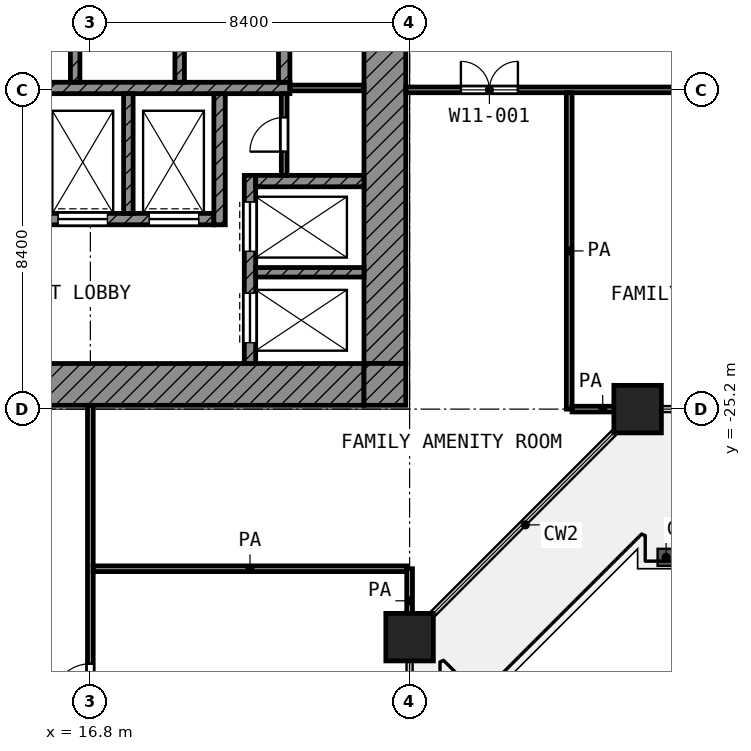
"""IFC4 building model, lengths in metres.
Left out: names, types, materials, properties, quantities, classifications, styles, units other than length and angle.
Written with IfcOpenShell. Run it as: python <this file> out.ifc"""

import sys

from ifc_helpers import new_model, si_unit, direction, frame, frame_2d, origin, origin_2d, place, context, subcontext, project, spatial, rectangle, extrude, element, fill, save


model = new_model("IFC4")
c1 = context("Model", 3, precision=1e-05, world=origin(), true_north=direction((0.0, 1.0)))
c2 = subcontext(c1, "Body", "Model", "MODEL_VIEW")
j1 = project(units=[si_unit("LENGTHUNIT", "METRE"), si_unit("PLANEANGLEUNIT", "RADIAN")], contexts=[c1])
p1 = place(None, origin())
s1 = spatial("IfcSite", under=j1, at=p1, CompositionType="ELEMENT")
p2 = place(p1, origin())
s2 = spatial("IfcBuilding", under=s1, at=p2, CompositionType="ELEMENT")
p3 = place(p2, frame((0.0, 0.0, 51.8)))
s3 = spatial("IfcBuildingStorey", under=s2, at=p3, CompositionType="ELEMENT", Elevation=51.8)
for number, where, z_axis, x_axis in (
    (1, (31.2, -25.2, 0.0), (0.0, 0.0, 1.0), (1.0, 0.0, 0.0)),
    (2, (25.2, -31.2, 0.0), (0.0, 0.0, 1.0), (1.0, 0.0, 0.0)),
):
    element("IfcColumn", number, at=place(p3, frame(where, z_axis=z_axis, x_axis=x_axis)), inside=s3, PredefinedType="COLUMN", context=c2, shape_type="SweptSolid", body=[
        extrude(rectangle(XDim=1.25, YDim=1.25, at=origin_2d()), origin(), (0.0, 0.0, 1.0), 4.2),
    ])
p4 = place(p3, frame((24.55, -24.0, 0.0), z_axis=(0.0, 0.0, 1.0), x_axis=(0.0, 1.0, 0.0)))
e3 = element("IfcWall", 3, at=p4, inside=s3, PredefinedType="SHEAR", context=c2, shape_type="SweptSolid", body=[
    extrude(rectangle(XDim=18.6, YDim=1.1, at=frame_2d((9.3, 0.0))), origin(), (0.0, 0.0, 1.0), 3.9),
])
p5 = place(p4, frame((10.5, 0.0, 0.0)))
e4 = element("IfcOpeningElement", 4, at=p5, cuts=e3, PredefinedType="OPENING", context=c2, shape_type="SweptSolid", body=[
    extrude(rectangle(XDim=1.8, YDim=2.1, at=frame_2d((0.9, 1.05))), frame((0.0, 0.56, 0.0), z_axis=(0.0, -1.0, 0.0), x_axis=(1.0, 0.0, 0.0)), (0.0, 0.0, 1.0), 1.12),
])
p6 = place(p3, frame((5.4, -24.55, 0.0), z_axis=(0.0, 0.0, 1.0), x_axis=(1.0, 0.0, 0.0)))
e5 = element("IfcWall", 5, at=p6, inside=s3, PredefinedType="SHEAR", context=c2, shape_type="SweptSolid", body=[
    extrude(rectangle(XDim=18.6, YDim=1.1, at=frame_2d((9.3, 0.0))), origin(), (0.0, 0.0, 1.0), 3.9),
])
p7 = place(p6, frame((6.3, 0.0, 0.0)))
e6 = element("IfcOpeningElement", 6, at=p7, cuts=e5, PredefinedType="OPENING", context=c2, shape_type="SweptSolid", body=[
    extrude(rectangle(XDim=1.8, YDim=2.1, at=frame_2d((0.9, 1.05))), frame((0.0, 0.56, 0.0), z_axis=(0.0, -1.0, 0.0), x_axis=(1.0, 0.0, 0.0)), (0.0, 0.0, 1.0), 1.12),
])
p8 = place(p3, frame((24.55, -25.1, 0.0), z_axis=(0.0, 0.0, 1.0), x_axis=(0.0, 1.0, 0.0)))
e7 = element("IfcWall", 7, at=p8, inside=s3, PredefinedType="SHEAR", context=c2, shape_type="SweptSolid", body=[
    extrude(rectangle(XDim=1.1, YDim=1.1, at=frame_2d((0.55, 0.0))), origin(), (0.0, 0.0, 1.0), 3.9),
])
p9 = place(p3, frame((5.4, -16.75, 0.0), z_axis=(0.0, 0.0, 1.0), x_axis=(1.0, 0.0, 0.0)))
e8 = element("IfcWall", 8, at=p9, inside=s3, PredefinedType="SHEAR", context=c2, shape_type="SweptSolid", body=[
    extrude(rectangle(XDim=16.65, YDim=0.3, at=frame_2d((8.325, 0.0))), origin(), (0.0, 0.0, 1.0), 3.9),
])
p10 = place(p3, frame((5.4, -20.2, 0.0), z_axis=(0.0, 0.0, 1.0), x_axis=(1.0, 0.0, 0.0)))
e9 = element("IfcWall", 9, at=p10, inside=s3, PredefinedType="SHEAR", context=c2, shape_type="SweptSolid", body=[
    extrude(rectangle(XDim=14.65, YDim=0.3, at=frame_2d((7.325, 0.0))), origin(), (0.0, 0.0, 1.0), 3.9),
])
p11 = place(p10, frame((10.55, 0.0, 0.0)))
e10 = element("IfcOpeningElement", 10, at=p11, cuts=e9, PredefinedType="OPENING", context=c2, shape_type="SweptSolid", body=[
    extrude(rectangle(XDim=1.3, YDim=2.1, at=frame_2d((0.65, 1.05))), frame((0.0, 0.16, 0.0), z_axis=(0.0, -1.0, 0.0), x_axis=(1.0, 0.0, 0.0)), (0.0, 0.0, 1.0), 0.32),
])
p12 = place(p10, frame((12.95, 0.0, 0.0)))
e11 = element("IfcOpeningElement", 11, at=p12, cuts=e9, PredefinedType="OPENING", context=c2, shape_type="SweptSolid", body=[
    extrude(rectangle(XDim=1.3, YDim=2.1, at=frame_2d((0.65, 1.05))), frame((0.0, 0.16, 0.0), z_axis=(0.0, -1.0, 0.0), x_axis=(1.0, 0.0, 0.0)), (0.0, 0.0, 1.0), 0.32),
])
p13 = place(p10, frame((0.55, 0.0, 0.0)))
e12 = element("IfcOpeningElement", 12, at=p13, cuts=e9, PredefinedType="OPENING", context=c2, shape_type="SweptSolid", body=[
    extrude(rectangle(XDim=1.3, YDim=2.1, at=frame_2d((0.65, 1.05))), frame((0.0, 0.16, 0.0), z_axis=(0.0, -1.0, 0.0), x_axis=(1.0, 0.0, 0.0)), (0.0, 0.0, 1.0), 0.32),
])
p14 = place(p10, frame((2.95, 0.0, 0.0)))
e13 = element("IfcOpeningElement", 13, at=p14, cuts=e9, PredefinedType="OPENING", context=c2, shape_type="SweptSolid", body=[
    extrude(rectangle(XDim=1.3, YDim=2.1, at=frame_2d((0.65, 1.05))), frame((0.0, 0.16, 0.0), z_axis=(0.0, -1.0, 0.0), x_axis=(1.0, 0.0, 0.0)), (0.0, 0.0, 1.0), 0.32),
])
p15 = place(p10, frame((6.55, 0.0, 0.0)))
e14 = element("IfcOpeningElement", 14, at=p15, cuts=e9, PredefinedType="OPENING", context=c2, shape_type="SweptSolid", body=[
    extrude(rectangle(XDim=0.9, YDim=2.1, at=frame_2d((0.45, 1.05))), frame((0.0, 0.16, 0.0), z_axis=(0.0, -1.0, 0.0), x_axis=(1.0, 0.0, 0.0)), (0.0, 0.0, 1.0), 0.32),
])
p16 = place(p10, frame((8.95, 0.0, 0.0)))
e15 = element("IfcOpeningElement", 15, at=p16, cuts=e9, PredefinedType="OPENING", context=c2, shape_type="SweptSolid", body=[
    extrude(rectangle(XDim=0.9, YDim=2.1, at=frame_2d((0.45, 1.05))), frame((0.0, 0.16, 0.0), z_axis=(0.0, -1.0, 0.0), x_axis=(1.0, 0.0, 0.0)), (0.0, 0.0, 1.0), 0.32),
])
p17 = place(p3, frame((20.2, -20.35, 0.0), z_axis=(0.0, 0.0, 1.0), x_axis=(0.0, 1.0, 0.0)))
e16 = element("IfcWall", 16, at=p17, inside=s3, PredefinedType="SHEAR", context=c2, shape_type="SweptSolid", body=[
    extrude(rectangle(XDim=3.45, YDim=0.3, at=frame_2d((1.725, 0.0))), origin(), (0.0, 0.0, 1.0), 3.9),
])
p18 = place(p3, frame((21.9, -16.6, 0.0), z_axis=(0.0, 0.0, 1.0), x_axis=(0.0, 1.0, 0.0)))
e17 = element("IfcWall", 17, at=p18, inside=s3, PredefinedType="SHEAR", context=c2, shape_type="SweptSolid", body=[
    extrude(rectangle(XDim=2.35, YDim=0.3, at=frame_2d((1.175, 0.0))), origin(), (0.0, 0.0, 1.0), 3.9),
])
p19 = place(p3, frame((21.15, -19.2, 0.0), z_axis=(0.0, 0.0, 1.0), x_axis=(1.0, 0.0, 0.0)))
e18 = element("IfcWall", 18, at=p19, inside=s3, PredefinedType="SHEAR", context=c2, shape_type="SweptSolid", body=[
    extrude(rectangle(XDim=2.85, YDim=0.3, at=frame_2d((1.425, 0.0))), origin(), (0.0, 0.0, 1.0), 3.9),
])
p20 = place(p3, frame((21.0, -24.0, 0.0), z_axis=(0.0, 0.0, 1.0), x_axis=(0.0, 1.0, 0.0)))
e19 = element("IfcWall", 19, at=p20, inside=s3, PredefinedType="SHEAR", context=c2, shape_type="SweptSolid", body=[
    extrude(rectangle(XDim=4.95, YDim=0.3, at=frame_2d((2.475, 0.0))), origin(), (0.0, 0.0, 1.0), 3.9),
])
p21 = place(p20, frame((2.95, 0.0, 0.0)))
e20 = element("IfcOpeningElement", 20, at=p21, cuts=e19, PredefinedType="OPENING", context=c2, shape_type="SweptSolid", body=[
    extrude(rectangle(XDim=1.3, YDim=2.1, at=frame_2d((0.65, 1.05))), frame((0.0, 0.16, 0.0), z_axis=(0.0, -1.0, 0.0), x_axis=(1.0, 0.0, 0.0)), (0.0, 0.0, 1.0), 0.32),
])
p22 = place(p20, frame((0.55, 0.0, 0.0)))
e21 = element("IfcOpeningElement", 21, at=p22, cuts=e19, PredefinedType="OPENING", context=c2, shape_type="SweptSolid", body=[
    extrude(rectangle(XDim=1.3, YDim=2.1, at=frame_2d((0.65, 1.05))), frame((0.0, 0.16, 0.0), z_axis=(0.0, -1.0, 0.0), x_axis=(1.0, 0.0, 0.0)), (0.0, 0.0, 1.0), 0.32),
])
p23 = place(p3, frame((21.15, -21.6, 0.0), z_axis=(0.0, 0.0, 1.0), x_axis=(1.0, 0.0, 0.0)))
e22 = element("IfcWall", 22, at=p23, inside=s3, PredefinedType="SHEAR", context=c2, shape_type="SweptSolid", body=[
    extrude(rectangle(XDim=2.85, YDim=0.25, at=frame_2d((1.425, 0.0))), origin(), (0.0, 0.0, 1.0), 3.9),
])
p24 = place(p3, frame((17.8, -20.05, 0.0), z_axis=(0.0, 0.0, 1.0), x_axis=(0.0, 1.0, 0.0)))
e23 = element("IfcWall", 23, at=p24, inside=s3, PredefinedType="SHEAR", context=c2, shape_type="SweptSolid", body=[
    extrude(rectangle(XDim=3.15, YDim=0.25, at=frame_2d((1.575, 0.0))), origin(), (0.0, 0.0, 1.0), 3.9),
])
for number, where, z_axis, x_axis in (
    (24, (16.4, -16.6, 0.0), (0.0, 0.0, 1.0), (0.0, 1.0, 0.0)),
    (25, (19.15, -16.6, 0.0), (0.0, 0.0, 1.0), (0.0, 1.0, 0.0)),
):
    element("IfcWall", number, at=place(p3, frame(where, z_axis=z_axis, x_axis=x_axis)), inside=s3, PredefinedType="SHEAR", context=c2, shape_type="SweptSolid", body=[
        extrude(rectangle(XDim=2.35, YDim=0.25, at=frame_2d((1.175, 0.0))), origin(), (0.0, 0.0, 1.0), 3.9),
    ])
p25 = place(p3, frame((21.9, -19.05, 0.0), z_axis=(0.0, 0.0, 1.0), x_axis=(0.0, 1.0, 0.0)))
e26 = element("IfcWall", 26, at=p25, inside=s3, PredefinedType="PARTITIONING", context=c2, shape_type="SweptSolid", body=[
    extrude(rectangle(XDim=2.15, YDim=0.15, at=frame_2d((1.075, 0.0))), origin(), (0.0, 0.0, 1.0), 3.9),
])
p26 = place(p25, frame((0.625, 0.0, 0.0)))
e27 = element("IfcOpeningElement", 27, at=p26, cuts=e26, PredefinedType="OPENING", context=c2, shape_type="SweptSolid", body=[
    extrude(rectangle(XDim=0.9, YDim=2.1, at=frame_2d((0.45, 1.05))), frame((0.0, 0.085, 0.0), z_axis=(0.0, -1.0, 0.0), x_axis=(1.0, 0.0, 0.0)), (0.0, 0.0, 1.0), 0.17),
])
p27 = place(p3, frame((22.05, -16.75, 0.0), z_axis=(0.0, 0.0, 1.0), x_axis=(1.0, 0.0, 0.0)))
e28 = element("IfcWall", 28, at=p27, inside=s3, PredefinedType="PARTITIONING", context=c2, shape_type="SweptSolid", body=[
    extrude(rectangle(XDim=1.95, YDim=0.15, at=frame_2d((0.975, 0.0))), origin(), (0.0, 0.0, 1.0), 3.9),
])
p28 = place(p3, frame((16.875, -29.4, 0.0), z_axis=(0.0, 0.0, 1.0), x_axis=(1.0, 0.0, 0.0)))
e29 = element("IfcWall", 29, at=p28, inside=s3, PredefinedType="PARTITIONING", context=c2, shape_type="SweptSolid", body=[
    extrude(rectangle(XDim=8.25, YDim=0.15, at=frame_2d((4.125, 0.0))), origin(), (0.0, 0.0, 1.0), 3.9),
])
p29 = place(p3, frame((29.475, -25.2, 0.0), z_axis=(0.0, 0.0, 1.0), x_axis=(1.0, 0.0, 0.0)))
e30 = element("IfcWall", 30, at=p29, inside=s3, PredefinedType="PARTITIONING", context=c2, shape_type="SweptSolid", body=[
    extrude(rectangle(XDim=1.612, YDim=0.15, at=frame_2d((0.806, 0.0))), origin(), (0.0, 0.0, 1.0), 3.9),
])
p30 = place(p3, frame((25.1, -16.8, 0.0), z_axis=(0.0, 0.0, 1.0), x_axis=(1.0, 0.0, 0.0)))
e31 = element("IfcWall", 31, at=p30, inside=s3, PredefinedType="PARTITIONING", context=c2, shape_type="SweptSolid", body=[
    extrude(rectangle(XDim=54.62, YDim=0.15, at=frame_2d((27.31, 0.0))), origin(), (0.0, 0.0, 1.0), 3.9),
])
p31 = place(p30, frame((1.45, 0.0, 0.0)))
e32 = element("IfcOpeningElement", 32, at=p31, cuts=e31, PredefinedType="OPENING", context=c2, shape_type="SweptSolid", body=[
    extrude(rectangle(XDim=1.5, YDim=2.1, at=frame_2d((0.75, 1.05))), frame((0.0, 0.085, 0.0), z_axis=(0.0, -1.0, 0.0), x_axis=(1.0, 0.0, 0.0)), (0.0, 0.0, 1.0), 0.17),
])
p32 = place(p30, frame((9.25, 0.0, 0.0)))
e33 = element("IfcOpeningElement", 33, at=p32, cuts=e31, PredefinedType="OPENING", context=c2, shape_type="SweptSolid", body=[
    extrude(rectangle(XDim=1.5, YDim=2.1, at=frame_2d((0.75, 1.05))), frame((0.0, 0.085, 0.0), z_axis=(0.0, -1.0, 0.0), x_axis=(1.0, 0.0, 0.0)), (0.0, 0.0, 1.0), 0.17),
])
p33 = place(p30, frame((15.0, 0.0, 0.0)))
e34 = element("IfcOpeningElement", 34, at=p33, cuts=e31, PredefinedType="OPENING", context=c2, shape_type="SweptSolid", body=[
    extrude(rectangle(XDim=1.2, YDim=2.1, at=frame_2d((0.6, 1.05))), frame((0.0, 0.085, 0.0), z_axis=(0.0, -1.0, 0.0), x_axis=(1.0, 0.0, 0.0)), (0.0, 0.0, 1.0), 0.17),
])
p34 = place(p30, frame((17.6, 0.0, 0.0)))
e35 = element("IfcOpeningElement", 35, at=p34, cuts=e31, PredefinedType="OPENING", context=c2, shape_type="SweptSolid", body=[
    extrude(rectangle(XDim=1.2, YDim=2.1, at=frame_2d((0.6, 1.05))), frame((0.0, 0.085, 0.0), z_axis=(0.0, -1.0, 0.0), x_axis=(1.0, 0.0, 0.0)), (0.0, 0.0, 1.0), 0.17),
])
p35 = place(p30, frame((26.2, 0.0, 0.0)))
e36 = element("IfcOpeningElement", 36, at=p35, cuts=e31, PredefinedType="OPENING", context=c2, shape_type="SweptSolid", body=[
    extrude(rectangle(XDim=1.2, YDim=2.1, at=frame_2d((0.6, 1.05))), frame((0.0, 0.085, 0.0), z_axis=(0.0, -1.0, 0.0), x_axis=(1.0, 0.0, 0.0)), (0.0, 0.0, 1.0), 0.17),
])
p36 = place(p30, frame((23.4, 0.0, 0.0)))
e37 = element("IfcOpeningElement", 37, at=p36, cuts=e31, PredefinedType="OPENING", context=c2, shape_type="SweptSolid", body=[
    extrude(rectangle(XDim=1.2, YDim=2.1, at=frame_2d((0.6, 1.05))), frame((0.0, 0.085, 0.0), z_axis=(0.0, -1.0, 0.0), x_axis=(1.0, 0.0, 0.0)), (0.0, 0.0, 1.0), 0.17),
])
p37 = place(p30, frame((28.45, 0.0, 0.0)))
e38 = element("IfcOpeningElement", 38, at=p37, cuts=e31, PredefinedType="OPENING", context=c2, shape_type="SweptSolid", body=[
    extrude(rectangle(XDim=1.2, YDim=2.1, at=frame_2d((0.6, 1.05))), frame((0.0, 0.085, 0.0), z_axis=(0.0, -1.0, 0.0), x_axis=(1.0, 0.0, 0.0)), (0.0, 0.0, 1.0), 0.17),
])
p38 = place(p30, frame((31.8, 0.0, 0.0)))
e39 = element("IfcOpeningElement", 39, at=p38, cuts=e31, PredefinedType="OPENING", context=c2, shape_type="SweptSolid", body=[
    extrude(rectangle(XDim=1.2, YDim=2.1, at=frame_2d((0.6, 1.05))), frame((0.0, 0.085, 0.0), z_axis=(0.0, -1.0, 0.0), x_axis=(1.0, 0.0, 0.0)), (0.0, 0.0, 1.0), 0.17),
])
p39 = place(p30, frame((30.35, 0.0, 0.0)))
e40 = element("IfcOpeningElement", 40, at=p39, cuts=e31, PredefinedType="OPENING", context=c2, shape_type="SweptSolid", body=[
    extrude(rectangle(XDim=1.1, YDim=2.1, at=frame_2d((0.55, 1.05))), frame((0.0, 0.085, 0.0), z_axis=(0.0, -1.0, 0.0), x_axis=(1.0, 0.0, 0.0)), (0.0, 0.0, 1.0), 0.17),
])
p40 = place(p30, frame((40.2, 0.0, 0.0)))
e41 = element("IfcOpeningElement", 41, at=p40, cuts=e31, PredefinedType="OPENING", context=c2, shape_type="SweptSolid", body=[
    extrude(rectangle(XDim=1.2, YDim=2.1, at=frame_2d((0.6, 1.05))), frame((0.0, 0.085, 0.0), z_axis=(0.0, -1.0, 0.0), x_axis=(1.0, 0.0, 0.0)), (0.0, 0.0, 1.0), 0.17),
])
p41 = place(p30, frame((43.1, 0.0, 0.0)))
e42 = element("IfcOpeningElement", 42, at=p41, cuts=e31, PredefinedType="OPENING", context=c2, shape_type="SweptSolid", body=[
    extrude(rectangle(XDim=1.2, YDim=2.1, at=frame_2d((0.6, 1.05))), frame((0.0, 0.085, 0.0), z_axis=(0.0, -1.0, 0.0), x_axis=(1.0, 0.0, 0.0)), (0.0, 0.0, 1.0), 0.17),
])
p42 = place(p30, frame((51.2, 0.0, 0.0)))
e43 = element("IfcOpeningElement", 43, at=p42, cuts=e31, PredefinedType="OPENING", context=c2, shape_type="SweptSolid", body=[
    extrude(rectangle(XDim=1.5, YDim=2.1, at=frame_2d((0.75, 1.05))), frame((0.0, 0.085, 0.0), z_axis=(0.0, -1.0, 0.0), x_axis=(1.0, 0.0, 0.0)), (0.0, 0.0, 1.0), 0.17),
])
p43 = place(p3, frame((16.8, -71.32, 0.0), z_axis=(0.0, 0.0, 1.0), x_axis=(0.0, 1.0, 0.0)))
e44 = element("IfcWall", 44, at=p43, inside=s3, PredefinedType="PARTITIONING", context=c2, shape_type="SweptSolid", body=[
    extrude(rectangle(XDim=46.22, YDim=0.15, at=frame_2d((23.11, 0.0))), origin(), (0.0, 0.0, 1.0), 3.9),
])
p44 = place(p43, frame((38.42, 0.0, 0.0)))
e45 = element("IfcOpeningElement", 45, at=p44, cuts=e44, PredefinedType="OPENING", context=c2, shape_type="SweptSolid", body=[
    extrude(rectangle(XDim=1.0, YDim=2.1, at=frame_2d((0.5, 1.05))), frame((0.0, 0.085, 0.0), z_axis=(0.0, -1.0, 0.0), x_axis=(1.0, 0.0, 0.0)), (0.0, 0.0, 1.0), 0.17),
])
p45 = place(p43, frame((30.22, 0.0, 0.0)))
e46 = element("IfcOpeningElement", 46, at=p45, cuts=e44, PredefinedType="OPENING", context=c2, shape_type="SweptSolid", body=[
    extrude(rectangle(XDim=1.2, YDim=2.1, at=frame_2d((0.6, 1.05))), frame((0.0, 0.085, 0.0), z_axis=(0.0, -1.0, 0.0), x_axis=(1.0, 0.0, 0.0)), (0.0, 0.0, 1.0), 0.17),
])
p46 = place(p43, frame((27.42, 0.0, 0.0)))
e47 = element("IfcOpeningElement", 47, at=p46, cuts=e44, PredefinedType="OPENING", context=c2, shape_type="SweptSolid", body=[
    extrude(rectangle(XDim=1.2, YDim=2.1, at=frame_2d((0.6, 1.05))), frame((0.0, 0.085, 0.0), z_axis=(0.0, -1.0, 0.0), x_axis=(1.0, 0.0, 0.0)), (0.0, 0.0, 1.0), 0.17),
])
p47 = place(p43, frame((25.57, 0.0, 0.0)))
e48 = element("IfcOpeningElement", 48, at=p47, cuts=e44, PredefinedType="OPENING", context=c2, shape_type="SweptSolid", body=[
    extrude(rectangle(XDim=1.2, YDim=2.1, at=frame_2d((0.6, 1.05))), frame((0.0, 0.085, 0.0), z_axis=(0.0, -1.0, 0.0), x_axis=(1.0, 0.0, 0.0)), (0.0, 0.0, 1.0), 0.17),
])
p48 = place(p43, frame((21.62, 0.0, 0.0)))
e49 = element("IfcOpeningElement", 49, at=p48, cuts=e44, PredefinedType="OPENING", context=c2, shape_type="SweptSolid", body=[
    extrude(rectangle(XDim=1.2, YDim=2.1, at=frame_2d((0.6, 1.05))), frame((0.0, 0.085, 0.0), z_axis=(0.0, -1.0, 0.0), x_axis=(1.0, 0.0, 0.0)), (0.0, 0.0, 1.0), 0.17),
])
p49 = place(p43, frame((14.32, 0.0, 0.0)))
e50 = element("IfcOpeningElement", 50, at=p49, cuts=e44, PredefinedType="OPENING", context=c2, shape_type="SweptSolid", body=[
    extrude(rectangle(XDim=1.2, YDim=2.1, at=frame_2d((0.6, 1.05))), frame((0.0, 0.085, 0.0), z_axis=(0.0, -1.0, 0.0), x_axis=(1.0, 0.0, 0.0)), (0.0, 0.0, 1.0), 0.17),
])
p50 = place(p43, frame((18.52, 0.0, 0.0)))
e51 = element("IfcOpeningElement", 51, at=p50, cuts=e44, PredefinedType="OPENING", context=c2, shape_type="SweptSolid", body=[
    extrude(rectangle(XDim=1.2, YDim=2.1, at=frame_2d((0.6, 1.05))), frame((0.0, 0.085, 0.0), z_axis=(0.0, -1.0, 0.0), x_axis=(1.0, 0.0, 0.0)), (0.0, 0.0, 1.0), 0.17),
])
p51 = place(p43, frame((10.92, 0.0, 0.0)))
e52 = element("IfcOpeningElement", 52, at=p51, cuts=e44, PredefinedType="OPENING", context=c2, shape_type="SweptSolid", body=[
    extrude(rectangle(XDim=0.9, YDim=2.1, at=frame_2d((0.45, 1.05))), frame((0.0, 0.085, 0.0), z_axis=(0.0, -1.0, 0.0), x_axis=(1.0, 0.0, 0.0)), (0.0, 0.0, 1.0), 0.17),
])
p52 = place(p43, frame((4.82, 0.0, 0.0)))
e53 = element("IfcOpeningElement", 53, at=p52, cuts=e44, PredefinedType="OPENING", context=c2, shape_type="SweptSolid", body=[
    extrude(rectangle(XDim=1.5, YDim=2.1, at=frame_2d((0.75, 1.05))), frame((0.0, 0.085, 0.0), z_axis=(0.0, -1.0, 0.0), x_axis=(1.0, 0.0, 0.0)), (0.0, 0.0, 1.0), 0.17),
])
p53 = place(p3, frame((25.2, -31.087, 0.0), z_axis=(0.0, 0.0, 1.0), x_axis=(0.0, 1.0, 0.0)))
e54 = element("IfcWall", 54, at=p53, inside=s3, PredefinedType="PARTITIONING", context=c2, shape_type="SweptSolid", body=[
    extrude(rectangle(XDim=1.687, YDim=0.15, at=frame_2d((0.844, 0.0))), origin(), (0.0, 0.0, 1.0), 3.9),
])
p54 = place(p3, frame((29.4, -25.2, 0.0), z_axis=(0.0, 0.0, 1.0), x_axis=(0.0, 1.0, 0.0)))
e55 = element("IfcWall", 55, at=p54, inside=s3, PredefinedType="PARTITIONING", context=c2, shape_type="SweptSolid", body=[
    extrude(rectangle(XDim=8.325, YDim=0.15, at=frame_2d((4.163, 0.0))), origin(), (0.0, 0.0, 1.0), 3.9),
])
p55 = place(p21, origin())
e56 = element("IfcDoor", 56, at=p55, inside=s3, OperationType="DOUBLE_DOOR_SLIDING", PredefinedType="DOOR", context=c2, shape_type="SweptSolid", body=[
    extrude(rectangle(XDim=1.3, YDim=2.1, at=frame_2d((0.65, 1.05))), frame((0.0, 0.025, 0.0), z_axis=(0.0, -1.0, 0.0), x_axis=(1.0, 0.0, 0.0)), (0.0, 0.0, 1.0), 0.05),
])
fill(e20, e56)
p56 = place(p22, origin())
e57 = element("IfcDoor", 57, at=p56, inside=s3, OperationType="DOUBLE_DOOR_SLIDING", PredefinedType="DOOR", context=c2, shape_type="SweptSolid", body=[
    extrude(rectangle(XDim=1.3, YDim=2.1, at=frame_2d((0.65, 1.05))), frame((0.0, 0.025, 0.0), z_axis=(0.0, -1.0, 0.0), x_axis=(1.0, 0.0, 0.0)), (0.0, 0.0, 1.0), 0.05),
])
fill(e21, e57)
p57 = place(p11, origin())
e58 = element("IfcDoor", 58, at=p57, inside=s3, OperationType="DOUBLE_DOOR_SLIDING", PredefinedType="DOOR", context=c2, shape_type="SweptSolid", body=[
    extrude(rectangle(XDim=1.3, YDim=2.1, at=frame_2d((0.65, 1.05))), frame((0.0, 0.025, 0.0), z_axis=(0.0, -1.0, 0.0), x_axis=(1.0, 0.0, 0.0)), (0.0, 0.0, 1.0), 0.05),
])
fill(e10, e58)
p58 = place(p12, origin())
e59 = element("IfcDoor", 59, at=p58, inside=s3, OperationType="DOUBLE_DOOR_SLIDING", PredefinedType="DOOR", context=c2, shape_type="SweptSolid", body=[
    extrude(rectangle(XDim=1.3, YDim=2.1, at=frame_2d((0.65, 1.05))), frame((0.0, 0.025, 0.0), z_axis=(0.0, -1.0, 0.0), x_axis=(1.0, 0.0, 0.0)), (0.0, 0.0, 1.0), 0.05),
])
fill(e11, e59)
p59 = place(p26, origin())
e60 = element("IfcDoor", 60, at=p59, inside=s3, OperationType="SINGLE_SWING_LEFT", PredefinedType="DOOR", context=c2, shape_type="SweptSolid", body=[
    extrude(rectangle(XDim=0.9, YDim=2.1, at=frame_2d((0.45, 1.05))), frame((0.0, 0.025, 0.0), z_axis=(0.0, -1.0, 0.0), x_axis=(1.0, 0.0, 0.0)), (0.0, 0.0, 1.0), 0.05),
])
fill(e27, e60)
p60 = place(p31, origin())
e61 = element("IfcDoor", 61, at=p60, inside=s3, OperationType="DOUBLE_DOOR_SINGLE_SWING", PredefinedType="DOOR", context=c2, shape_type="SweptSolid", body=[
    extrude(rectangle(XDim=1.5, YDim=2.1, at=frame_2d((0.75, 1.05))), frame((0.0, 0.025, 0.0), z_axis=(0.0, -1.0, 0.0), x_axis=(1.0, 0.0, 0.0)), (0.0, 0.0, 1.0), 0.05),
])
fill(e32, e61)
p61 = place(p44, origin())
e62 = element("IfcDoor", 62, at=p61, inside=s3, OperationType="SINGLE_SWING_LEFT", PredefinedType="DOOR", context=c2, shape_type="SweptSolid", body=[
    extrude(rectangle(XDim=1.0, YDim=2.1, at=frame_2d((0.5, 1.05))), frame((0.0, 0.025, 0.0), z_axis=(0.0, -1.0, 0.0), x_axis=(1.0, 0.0, 0.0)), (0.0, 0.0, 1.0), 0.05),
])
fill(e45, e62)
save(model, sys.argv[1])
